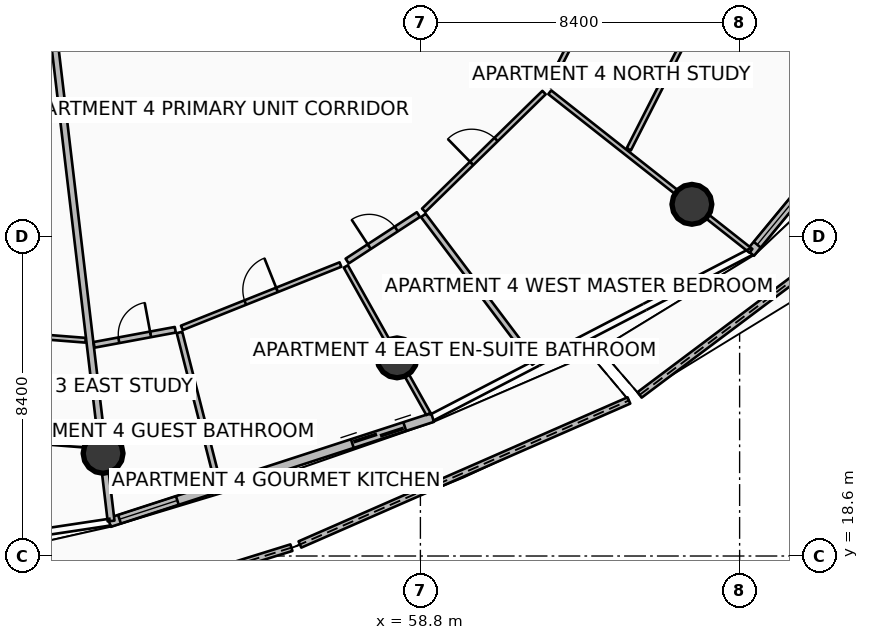
"""IFC4 building model, lengths in metres.
Left out: names, types, materials, properties, quantities, classifications, styles, units other than length and angle.
Written with IfcOpenShell. Run it as: python <this file> out.ifc"""

import sys

from ifc_helpers import new_model, si_unit, direction, frame, frame_2d, origin, origin_2d, place, context, subcontext, project, spatial, polyline, rectangle, circle, outline, extrude, element, fill, save


model = new_model("IFC4")
c1 = context("Model", 3, precision=1e-05, world=origin(), true_north=direction((0.0, 1.0)))
c2 = subcontext(c1, "Body", "Model", "MODEL_VIEW")
j1 = project(units=[si_unit("LENGTHUNIT", "METRE"), si_unit("PLANEANGLEUNIT", "RADIAN")], contexts=[c1])
p1 = place(None, origin())
s1 = spatial("IfcSite", under=j1, at=p1, CompositionType="ELEMENT")
p2 = place(p1, origin())
s2 = spatial("IfcBuilding", under=s1, at=p2, CompositionType="ELEMENT")
p3 = place(p2, frame((0.0, 0.0, 206.55)))
s3 = spatial("IfcBuildingStorey", under=s2, at=p3, CompositionType="ELEMENT", Elevation=206.55)
for number, where, z_axis, x_axis in (
    (1, (50.45, 21.3, 0.0), (0.0, 0.0, 1.0), (1.0, 0.0, 0.0)),
    (2, (58.185, 23.814, 0.0), (0.0, 0.0, 1.0), (1.0, 0.0, 0.0)),
    (3, (65.944, 27.854, 0.0), (0.0, 0.0, 1.0), (1.0, 0.0, 0.0)),
):
    element("IfcColumn", number, at=place(p3, frame(where, z_axis=z_axis, x_axis=x_axis)), inside=s3, PredefinedType="COLUMN", context=c2, shape_type="SweptSolid", body=[
        extrude(circle(Radius=0.525, at=origin_2d()), origin(), (0.0, 0.0, 1.0), 3.5),
    ])
p4 = place(p3, frame((46.108, 15.929, 0.0), z_axis=(0.0, 0.0, 1.0), x_axis=(0.954909554677, 0.296896854793, 0.0)))
e4 = element("IfcWall", 4, at=p4, inside=s3, PredefinedType="PARAPET", context=c2, shape_type="SweptSolid", body=[
    extrude(outline(polyline([(0.0, 0.0), (9.736, 0.0), (9.736, 1.348), (4.868, 1.562), (0.0, 1.747), (0.0, 0.0)])), frame((0.0, 0.09, 0.0), z_axis=(0.0, -1.0, 0.0), x_axis=(1.0, 0.0, 0.0)), (0.0, 0.0, 1.0), 0.18),
])
p5 = place(p3, frame((55.63, 18.903, 0.0), z_axis=(0.0, 0.0, 1.0), x_axis=(0.916057097562, 0.401047869968, 0.0)))
e5 = element("IfcWall", 5, at=p5, inside=s3, PredefinedType="PARAPET", context=c2, shape_type="SweptSolid", body=[
    extrude(outline(polyline([(0.0, 0.0), (9.45, 0.0), (9.45, 1.12), (4.725, 1.182), (0.0, 1.348), (0.0, 0.0)])), frame((0.0, 0.09, 0.0), z_axis=(0.0, -1.0, 0.0), x_axis=(1.0, 0.0, 0.0)), (0.0, 0.0, 1.0), 0.18),
])
p6 = place(p3, frame((64.568, 22.84, 0.0), z_axis=(0.0, 0.0, 1.0), x_axis=(0.799768695593, 0.600308282093, 0.0)))
e6 = element("IfcWall", 6, at=p6, inside=s3, PredefinedType="PARAPET", context=c2, shape_type="SweptSolid", body=[
    extrude(outline(polyline([(0.0, 0.0), (10.515, 0.0), (10.515, 1.348), (5.258, 1.182), (0.0, 1.12), (0.0, 0.0)])), frame((0.0, 0.09, 0.0), z_axis=(0.0, -1.0, 0.0), x_axis=(1.0, 0.0, 0.0)), (0.0, 0.0, 1.0), 0.18),
])
p7 = place(p3, frame((50.616, 19.481, 0.0), z_axis=(0.0, 0.0, 1.0), x_axis=(0.951058543936, 0.309010753869, 0.0)))
e7 = element("IfcWall", 7, at=p7, inside=s3, PredefinedType="SOLIDWALL", context=c2, shape_type="SweptSolid", body=[
    extrude(rectangle(XDim=8.942, YDim=0.24, at=frame_2d((4.471, 0.0))), origin(), (0.0, 0.0, 1.0), 2.45),
])
p8 = place(p7, frame((6.722, 0.0, 0.0)))
e8 = element("IfcOpeningElement", 8, at=p8, cuts=e7, PredefinedType="OPENING", context=c2, shape_type="SweptSolid", body=[
    extrude(rectangle(XDim=1.45, YDim=2.15, at=frame_2d((0.725, 1.075))), frame((0.0, 0.13, 0.0), z_axis=(0.0, -1.0, 0.0), x_axis=(1.0, 0.0, 0.0)), (0.0, 0.0, 1.0), 0.26),
])
p9 = place(p7, frame((0.28, 0.0, 0.65)))
e9 = element("IfcOpeningElement", 9, at=p9, cuts=e7, PredefinedType="OPENING", context=c2, shape_type="SweptSolid", body=[
    extrude(rectangle(XDim=1.6, YDim=1.5, at=frame_2d((0.8, 0.75))), frame((0.0, 0.13, 0.0), z_axis=(0.0, -1.0, 0.0), x_axis=(1.0, 0.0, 0.0)), (0.0, 0.0, 1.0), 0.26),
])
p10 = place(p3, frame((67.485, 26.576, 0.0), z_axis=(0.0, 0.0, 1.0), x_axis=(0.636759394418, 0.771062561418, 0.0)))
e10 = element("IfcWall", 10, at=p10, inside=s3, PredefinedType="SOLIDWALL", context=c2, shape_type="SweptSolid", body=[
    extrude(rectangle(XDim=10.494, YDim=0.24, at=frame_2d((5.247, 0.0))), origin(), (0.0, 0.0, 1.0), 2.45),
])
p11 = place(p10, frame((8.274, 0.0, 0.0)))
e11 = element("IfcOpeningElement", 11, at=p11, cuts=e10, PredefinedType="OPENING", context=c2, shape_type="SweptSolid", body=[
    extrude(rectangle(XDim=1.45, YDim=2.15, at=frame_2d((0.725, 1.075))), frame((0.0, 0.13, 0.0), z_axis=(0.0, -1.0, 0.0), x_axis=(1.0, 0.0, 0.0)), (0.0, 0.0, 1.0), 0.26),
])
p12 = place(p10, frame((0.28, 0.0, 0.65)))
e12 = element("IfcOpeningElement", 12, at=p12, cuts=e10, PredefinedType="OPENING", context=c2, shape_type="SweptSolid", body=[
    extrude(rectangle(XDim=1.6, YDim=1.5, at=frame_2d((0.8, 0.75))), frame((0.0, 0.13, 0.0), z_axis=(0.0, -1.0, 0.0), x_axis=(1.0, 0.0, 0.0)), (0.0, 0.0, 1.0), 0.26),
])
p13 = place(p3, frame((49.037, 33.241, 0.0), z_axis=(0.0, 0.0, 1.0), x_axis=(0.11753742895, -0.993068453228, 0.0)))
e13 = element("IfcWall", 13, at=p13, inside=s3, PredefinedType="PARTITIONING", context=c2, shape_type="SweptSolid", body=[
    extrude(rectangle(XDim=13.815, YDim=0.18, at=frame_2d((6.907, 0.0))), origin(), (0.0, 0.0, 1.0), 2.94),
])
p14 = place(p3, frame((43.263, 24.807, 0.0), z_axis=(0.0, 0.0, 1.0), x_axis=(0.996914936791, -0.078489545824, 0.0)))
e14 = element("IfcWall", 14, at=p14, inside=s3, PredefinedType="PARTITIONING", context=c2, shape_type="SweptSolid", body=[
    extrude(rectangle(XDim=6.747, YDim=0.125, at=frame_2d((3.373, 0.0))), origin(), (0.0, 0.0, 1.0), 2.94),
])
p15 = place(p14, frame((2.923, 0.0, 0.0)))
e15 = element("IfcOpeningElement", 15, at=p15, cuts=e14, PredefinedType="OPENING", context=c2, shape_type="SweptSolid", body=[
    extrude(rectangle(XDim=0.9, YDim=2.08, at=frame_2d((0.45, 1.04))), frame((0.0, 0.073, 0.0), z_axis=(0.0, -1.0, 0.0), x_axis=(1.0, 0.0, 0.0)), (0.0, 0.0, 1.0), 0.145),
])
p16 = place(p3, frame((42.501, 22.105, 0.0), z_axis=(0.0, 0.0, 1.0), x_axis=(0.996917595152, -0.078455774017, 0.0)))
e16 = element("IfcWall", 16, at=p16, inside=s3, PredefinedType="PARTITIONING", context=c2, shape_type="SweptSolid", body=[
    extrude(rectangle(XDim=7.842, YDim=0.125, at=frame_2d((3.921, 0.0))), origin(), (0.0, 0.0, 1.0), 2.94),
])
p17 = place(p16, frame((3.471, 0.0, 0.0)))
e17 = element("IfcOpeningElement", 17, at=p17, cuts=e16, PredefinedType="OPENING", context=c2, shape_type="SweptSolid", body=[
    extrude(rectangle(XDim=0.9, YDim=2.08, at=frame_2d((0.45, 1.04))), frame((0.0, 0.073, 0.0), z_axis=(0.0, -1.0, 0.0), x_axis=(1.0, 0.0, 0.0)), (0.0, 0.0, 1.0), 0.145),
])
p18 = place(p3, frame((50.212, 24.156, 0.0), z_axis=(0.0, 0.0, 1.0), x_axis=(0.983198523617, 0.182539483832, 0.0)))
e18 = element("IfcWall", 18, at=p18, inside=s3, PredefinedType="PARTITIONING", context=c2, shape_type="SweptSolid", body=[
    extrude(rectangle(XDim=2.175, YDim=0.15, at=frame_2d((1.087, 0.0))), origin(), (0.0, 0.0, 1.0), 2.94),
])
p19 = place(p18, frame((0.662, 0.0, 0.0)))
e19 = element("IfcOpeningElement", 19, at=p19, cuts=e18, PredefinedType="OPENING", context=c2, shape_type="SweptSolid", body=[
    extrude(rectangle(XDim=0.85, YDim=2.06, at=frame_2d((0.425, 1.03))), frame((0.0, 0.085, 0.0), z_axis=(0.0, -1.0, 0.0), x_axis=(1.0, 0.0, 0.0)), (0.0, 0.0, 1.0), 0.17),
])
p20 = place(p3, frame((52.461, 24.482, 0.0), z_axis=(0.0, 0.0, 1.0), x_axis=(0.246781707717, -0.969071095811, 0.0)))
e20 = element("IfcWall", 20, at=p20, inside=s3, PredefinedType="PARTITIONING", context=c2, shape_type="SweptSolid", body=[
    extrude(rectangle(XDim=4.07, YDim=0.15, at=frame_2d((2.035, 0.0))), origin(), (0.0, 0.0, 1.0), 2.94),
])
p21 = place(p3, frame((52.523, 24.603, 0.0), z_axis=(0.0, 0.0, 1.0), x_axis=(0.928686374253, 0.370866038182, 0.0)))
e21 = element("IfcWall", 21, at=p21, inside=s3, PredefinedType="PARTITIONING", context=c2, shape_type="SweptSolid", body=[
    extrude(rectangle(XDim=4.494, YDim=0.125, at=frame_2d((2.247, 0.0))), origin(), (0.0, 0.0, 1.0), 2.94),
])
p22 = place(p21, frame((1.797, 0.0, 0.0)))
e22 = element("IfcOpeningElement", 22, at=p22, cuts=e21, PredefinedType="OPENING", context=c2, shape_type="SweptSolid", body=[
    extrude(rectangle(XDim=0.9, YDim=2.08, at=frame_2d((0.45, 1.04))), frame((0.0, 0.073, 0.0), z_axis=(0.0, -1.0, 0.0), x_axis=(1.0, 0.0, 0.0)), (0.0, 0.0, 1.0), 0.145),
])
p23 = place(p3, frame((56.838, 26.219, 0.0), z_axis=(0.0, 0.0, 1.0), x_axis=(0.488608382443, -0.872503208365, 0.0)))
e23 = element("IfcWall", 23, at=p23, inside=s3, PredefinedType="PARTITIONING", context=c2, shape_type="SweptSolid", body=[
    extrude(rectangle(XDim=4.448, YDim=0.125, at=frame_2d((2.224, 0.0))), origin(), (0.0, 0.0, 1.0), 2.94),
])
p24 = place(p3, frame((56.873, 26.361, 0.0), z_axis=(0.0, 0.0, 1.0), x_axis=(0.837497725381, 0.54644081105, 0.0)))
e24 = element("IfcWall", 24, at=p24, inside=s3, PredefinedType="PARTITIONING", context=c2, shape_type="SweptSolid", body=[
    extrude(rectangle(XDim=2.238, YDim=0.15, at=frame_2d((1.119, 0.0))), origin(), (0.0, 0.0, 1.0), 2.94),
])
p25 = place(p24, frame((0.694, 0.0, 0.0)))
e25 = element("IfcOpeningElement", 25, at=p25, cuts=e24, PredefinedType="OPENING", context=c2, shape_type="SweptSolid", body=[
    extrude(rectangle(XDim=0.85, YDim=2.06, at=frame_2d((0.425, 1.03))), frame((0.0, 0.085, 0.0), z_axis=(0.0, -1.0, 0.0), x_axis=(1.0, 0.0, 0.0)), (0.0, 0.0, 1.0), 0.17),
])
p26 = place(p3, frame((58.876, 27.561, 0.0), z_axis=(0.0, 0.0, 1.0), x_axis=(0.601652635262, -0.798757852219, 0.0)))
e26 = element("IfcWall", 26, at=p26, inside=s3, PredefinedType="PARTITIONING", context=c2, shape_type="SweptSolid", body=[
    extrude(rectangle(XDim=4.865, YDim=0.15, at=frame_2d((2.433, 0.0))), origin(), (0.0, 0.0, 1.0), 2.94),
])
p27 = place(p3, frame((58.887, 27.696, 0.0), z_axis=(0.0, 0.0, 1.0), x_axis=(0.714833426799, 0.699294767556, 0.0)))
e27 = element("IfcWall", 27, at=p27, inside=s3, PredefinedType="PARTITIONING", context=c2, shape_type="SweptSolid", body=[
    extrude(rectangle(XDim=4.431, YDim=0.125, at=frame_2d((2.215, 0.0))), origin(), (0.0, 0.0, 1.0), 2.94),
])
p28 = place(p27, frame((1.765, 0.0, 0.0)))
e28 = element("IfcOpeningElement", 28, at=p28, cuts=e27, PredefinedType="OPENING", context=c2, shape_type="SweptSolid", body=[
    extrude(rectangle(XDim=0.9, YDim=2.08, at=frame_2d((0.45, 1.04))), frame((0.0, 0.073, 0.0), z_axis=(0.0, -1.0, 0.0), x_axis=(1.0, 0.0, 0.0)), (0.0, 0.0, 1.0), 0.145),
])
p29 = place(p3, frame((62.204, 30.802, 0.0), z_axis=(0.0, 0.0, 1.0), x_axis=(0.785315561472, -0.619095686393, 0.0)))
e29 = element("IfcWall", 29, at=p29, inside=s3, PredefinedType="PARTITIONING", context=c2, shape_type="SweptSolid", body=[
    extrude(rectangle(XDim=6.74, YDim=0.125, at=frame_2d((3.37, 0.0))), origin(), (0.0, 0.0, 1.0), 2.94),
])
p30 = place(p3, frame((62.175, 30.962, 0.0), z_axis=(0.0, 0.0, 1.0), x_axis=(0.454009704529, 0.890996738599, 0.0)))
e30 = element("IfcWall", 30, at=p30, inside=s3, PredefinedType="PARTITIONING", context=c2, shape_type="SweptSolid", body=[
    extrude(rectangle(XDim=6.798, YDim=0.125, at=frame_2d((3.399, 0.0))), origin(), (0.0, 0.0, 1.0), 2.94),
])
p31 = place(p30, frame((2.949, 0.0, 0.0)))
e31 = element("IfcOpeningElement", 31, at=p31, cuts=e30, PredefinedType="OPENING", context=c2, shape_type="SweptSolid", body=[
    extrude(rectangle(XDim=0.9, YDim=2.08, at=frame_2d((0.45, 1.04))), frame((0.0, 0.073, 0.0), z_axis=(0.0, -1.0, 0.0), x_axis=(1.0, 0.0, 0.0)), (0.0, 0.0, 1.0), 0.145),
])
p32 = place(p3, frame((64.283, 29.301, 0.0), z_axis=(0.0, 0.0, 1.0), x_axis=(0.453997104185, 0.891003159025, 0.0)))
e32 = element("IfcWall", 32, at=p32, inside=s3, PredefinedType="PARTITIONING", context=c2, shape_type="SweptSolid", body=[
    extrude(rectangle(XDim=7.845, YDim=0.125, at=frame_2d((3.923, 0.0))), origin(), (0.0, 0.0, 1.0), 2.94),
])
p33 = place(p32, frame((3.473, 0.0, 0.0)))
e33 = element("IfcOpeningElement", 33, at=p33, cuts=e32, PredefinedType="OPENING", context=c2, shape_type="SweptSolid", body=[
    extrude(rectangle(XDim=0.9, YDim=2.08, at=frame_2d((0.45, 1.04))), frame((0.0, 0.073, 0.0), z_axis=(0.0, -1.0, 0.0), x_axis=(1.0, 0.0, 0.0)), (0.0, 0.0, 1.0), 0.145),
])
p34 = place(p8, origin())
e34 = element("IfcDoor", 34, at=p34, inside=s3, OperationType="DOUBLE_DOOR_SLIDING", PredefinedType="DOOR", context=c2, shape_type="SweptSolid", body=[
    extrude(rectangle(XDim=1.45, YDim=2.15, at=frame_2d((0.725, 1.075))), frame((0.0, 0.025, 0.0), z_axis=(0.0, -1.0, 0.0), x_axis=(1.0, 0.0, 0.0)), (0.0, 0.0, 1.0), 0.05),
])
fill(e8, e34)
p35 = place(p9, origin())
e35 = element("IfcWindow", 35, at=p35, inside=s3, PartitioningType="SINGLE_PANEL", PredefinedType="WINDOW", context=c2, shape_type="SweptSolid", body=[
    extrude(rectangle(XDim=1.6, YDim=1.5, at=frame_2d((0.8, 0.75))), frame((0.0, 0.03, 0.0), z_axis=(0.0, -1.0, 0.0), x_axis=(1.0, 0.0, 0.0)), (0.0, 0.0, 1.0), 0.06),
])
fill(e9, e35)
p36 = place(p12, origin())
e36 = element("IfcWindow", 36, at=p36, inside=s3, PartitioningType="SINGLE_PANEL", PredefinedType="WINDOW", context=c2, shape_type="SweptSolid", body=[
    extrude(rectangle(XDim=1.6, YDim=1.5, at=frame_2d((0.8, 0.75))), frame((0.0, 0.03, 0.0), z_axis=(0.0, -1.0, 0.0), x_axis=(1.0, 0.0, 0.0)), (0.0, 0.0, 1.0), 0.06),
])
fill(e12, e36)
p37 = place(p19, origin())
e37 = element("IfcDoor", 37, at=p37, inside=s3, OperationType="SINGLE_SWING_RIGHT", PredefinedType="DOOR", context=c2, shape_type="SweptSolid", body=[
    extrude(rectangle(XDim=0.85, YDim=2.06, at=frame_2d((0.425, 1.03))), frame((0.0, 0.025, 0.0), z_axis=(0.0, -1.0, 0.0), x_axis=(1.0, 0.0, 0.0)), (0.0, 0.0, 1.0), 0.05),
])
fill(e19, e37)
p38 = place(p22, origin())
e38 = element("IfcDoor", 38, at=p38, inside=s3, OperationType="SINGLE_SWING_RIGHT", PredefinedType="DOOR", context=c2, shape_type="SweptSolid", body=[
    extrude(rectangle(XDim=0.9, YDim=2.08, at=frame_2d((0.45, 1.04))), frame((0.0, 0.025, 0.0), z_axis=(0.0, -1.0, 0.0), x_axis=(1.0, 0.0, 0.0)), (0.0, 0.0, 1.0), 0.05),
])
fill(e22, e38)
p39 = place(p25, origin())
e39 = element("IfcDoor", 39, at=p39, inside=s3, OperationType="SINGLE_SWING_LEFT", PredefinedType="DOOR", context=c2, shape_type="SweptSolid", body=[
    extrude(rectangle(XDim=0.85, YDim=2.06, at=frame_2d((0.425, 1.03))), frame((0.0, 0.025, 0.0), z_axis=(0.0, -1.0, 0.0), x_axis=(1.0, 0.0, 0.0)), (0.0, 0.0, 1.0), 0.05),
])
fill(e25, e39)
p40 = place(p28, origin())
e40 = element("IfcDoor", 40, at=p40, inside=s3, OperationType="SINGLE_SWING_LEFT", PredefinedType="DOOR", context=c2, shape_type="SweptSolid", body=[
    extrude(rectangle(XDim=0.9, YDim=2.08, at=frame_2d((0.45, 1.04))), frame((0.0, 0.025, 0.0), z_axis=(0.0, -1.0, 0.0), x_axis=(1.0, 0.0, 0.0)), (0.0, 0.0, 1.0), 0.05),
])
fill(e28, e40)
save(model, sys.argv[1])
